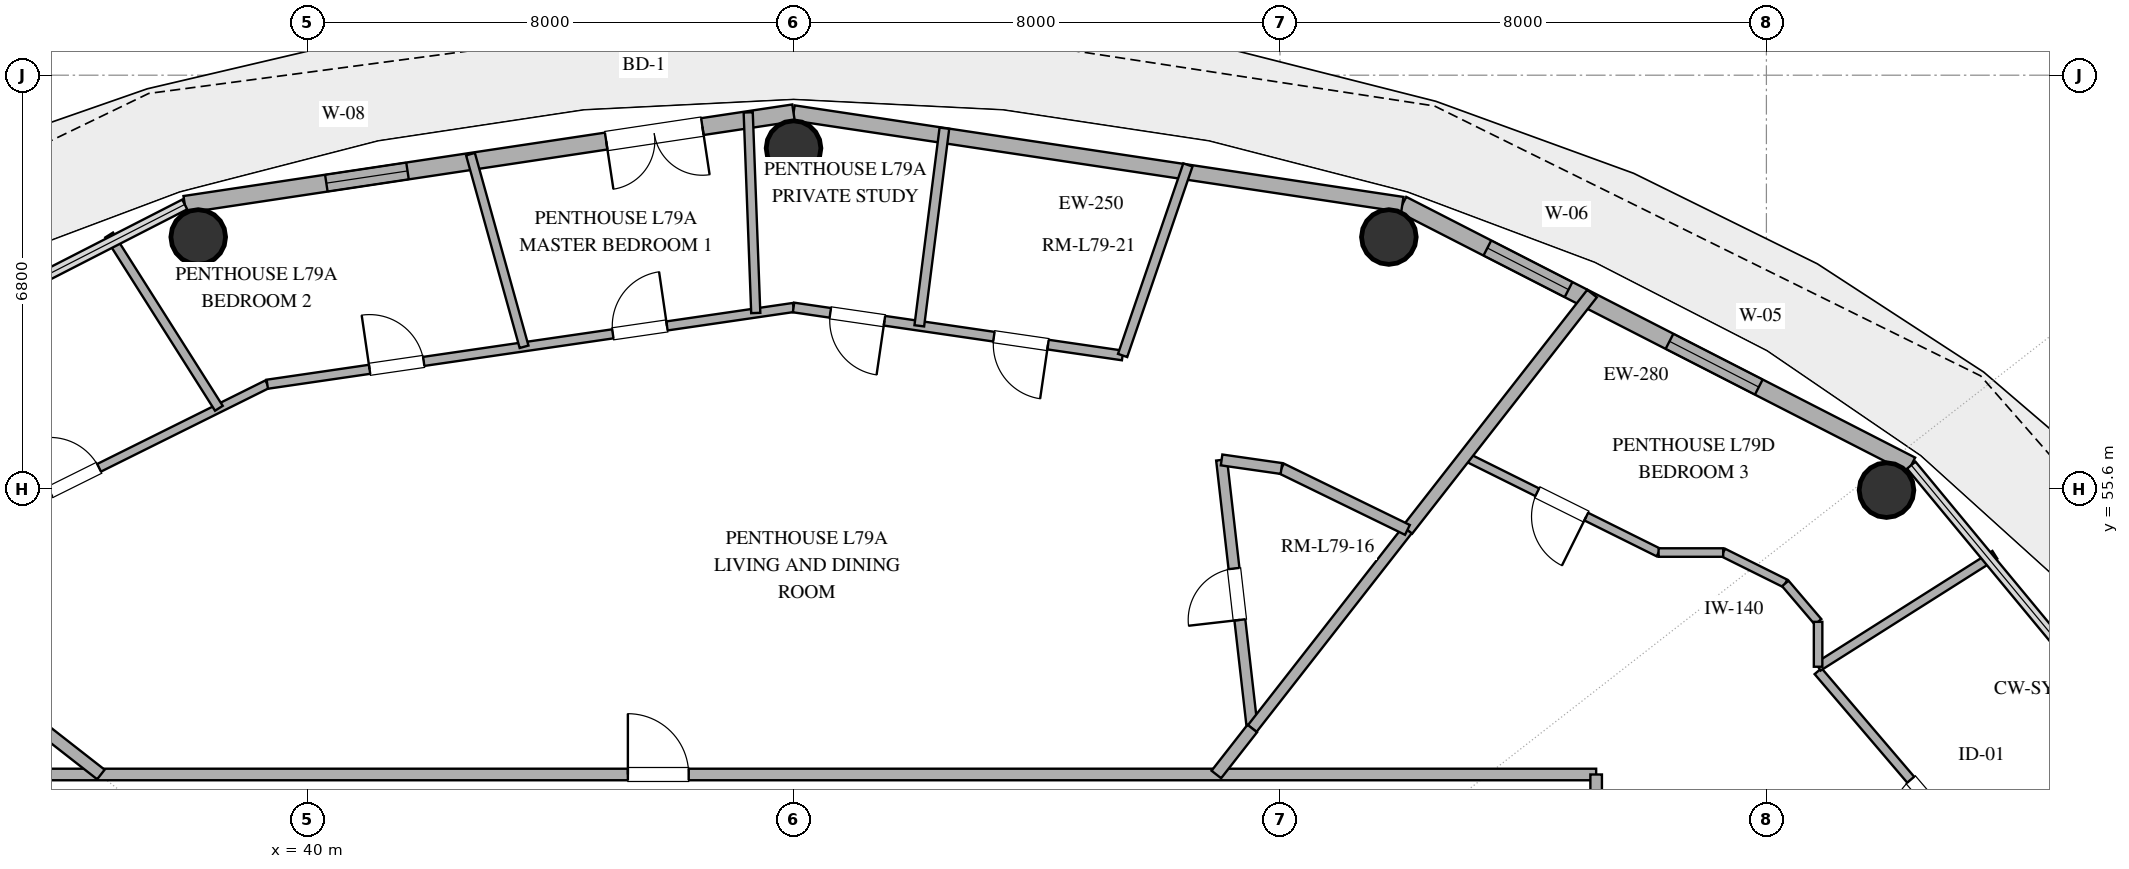
"""IFC4 building model, lengths in metres.
Left out: names, types, materials, properties, quantities, classifications, styles, units other than length and angle.
Written with IfcOpenShell. Run it as: python <this file> out.ifc"""

import sys

from ifc_helpers import new_model, si_unit, direction, frame, frame_2d, origin, origin_2d, place, context, subcontext, project, spatial, rectangle, hollow_circle, extrude, element, fill, save


model = new_model("IFC4")
c1 = context("Model", 3, precision=1e-05, world=origin(), true_north=direction((0.0, 1.0)))
c2 = subcontext(c1, "Body", "Model", "MODEL_VIEW")
j1 = project(units=[si_unit("LENGTHUNIT", "METRE"), si_unit("PLANEANGLEUNIT", "RADIAN")], contexts=[c1])
p1 = place(None, origin())
s1 = spatial("IfcSite", under=j1, at=p1, CompositionType="ELEMENT")
p2 = place(p1, origin())
s2 = spatial("IfcBuilding", under=s1, at=p2, CompositionType="ELEMENT")
p3 = place(p2, frame((0.0, 0.0, 305.4)))
s3 = spatial("IfcBuildingStorey", under=s2, at=p3, CompositionType="ELEMENT", Elevation=305.4)
for number, where, z_axis, x_axis in (
    (1, (65.975, 55.576, 0.0), (0.0, 0.0, 1.0), (1.0, 0.0, 0.0)),
    (2, (57.791, 59.739, 0.0), (0.0, 0.0, 1.0), (1.0, 0.0, 0.0)),
    (3, (48.0, 61.2, 0.0), (0.0, 0.0, 1.0), (1.0, 0.0, 0.0)),
    (4, (38.209, 59.739, 0.0), (0.0, 0.0, 1.0), (1.0, 0.0, 0.0)),
):
    element("IfcColumn", number, at=place(p3, frame(where, z_axis=z_axis, x_axis=x_axis)), inside=s3, PredefinedType="COLUMN", context=c2, shape_type="SweptSolid", body=[
        extrude(hollow_circle(Radius=0.45, WallThickness=0.025, at=origin_2d()), origin(), (0.0, 0.0, 1.0), 3.37),
    ])
p4 = place(p3, frame((66.383, 55.987, 0.0), z_axis=(0.0, 0.0, 1.0), x_axis=(-0.890007394051, 0.455946091699, 0.0)))
e5 = element("IfcWall", 5, at=p4, inside=s3, PredefinedType="SOLIDWALL", context=c2, shape_type="SweptSolid", body=[
    extrude(rectangle(XDim=9.404, YDim=0.28, at=frame_2d((4.702, 0.0))), origin(), (0.0, 0.0, 1.0), 3.37),
])
p5 = place(p4, frame((2.817, 0.0, 0.85)))
e6 = element("IfcOpeningElement", 6, at=p5, cuts=e5, PredefinedType="OPENING", context=c2, shape_type="SweptSolid", body=[
    extrude(rectangle(XDim=1.65, YDim=2.0, at=frame_2d((0.825, 1.0))), frame((0.0, 0.15, 0.0), z_axis=(0.0, -1.0, 0.0), x_axis=(1.0, 0.0, 0.0)), (0.0, 0.0, 1.0), 0.3),
])
p6 = place(p4, frame((6.333, 0.0, 0.85)))
e7 = element("IfcOpeningElement", 7, at=p6, cuts=e5, PredefinedType="OPENING", context=c2, shape_type="SweptSolid", body=[
    extrude(rectangle(XDim=1.5, YDim=2.0, at=frame_2d((0.75, 1.0))), frame((0.0, 0.15, 0.0), z_axis=(0.0, -1.0, 0.0), x_axis=(1.0, 0.0, 0.0)), (0.0, 0.0, 1.0), 0.3),
])
p7 = place(p3, frame((58.013, 60.274, 0.0), z_axis=(0.0, 0.0, 1.0), x_axis=(-0.988882522213, 0.148698881169, 0.0)))
e8 = element("IfcWall", 8, at=p7, inside=s3, PredefinedType="SOLIDWALL", context=c2, shape_type="SweptSolid", body=[
    extrude(rectangle(XDim=10.125, YDim=0.25, at=frame_2d((5.062, 0.0))), origin(), (0.0, 0.0, 1.0), 3.37),
])
p8 = place(p3, frame((48.0, 61.78, 0.0), z_axis=(0.0, 0.0, 1.0), x_axis=(-0.988882522213, -0.148698881169, 0.0)))
e9 = element("IfcWall", 9, at=p8, inside=s3, PredefinedType="SOLIDWALL", context=c2, shape_type="SweptSolid", body=[
    extrude(rectangle(XDim=10.125, YDim=0.28, at=frame_2d((5.062, 0.0))), origin(), (0.0, 0.0, 1.0), 3.37),
])
p9 = place(p8, frame((1.516, 0.0, 0.0)))
e10 = element("IfcOpeningElement", 10, at=p9, cuts=e9, PredefinedType="OPENING", context=c2, shape_type="SweptSolid", body=[
    extrude(rectangle(XDim=1.6, YDim=2.25, at=frame_2d((0.8, 1.125))), frame((0.0, 0.15, 0.0), z_axis=(0.0, -1.0, 0.0), x_axis=(1.0, 0.0, 0.0)), (0.0, 0.0, 1.0), 0.3),
])
p10 = place(p8, frame((6.42, 0.0, 0.85)))
e11 = element("IfcOpeningElement", 11, at=p10, cuts=e9, PredefinedType="OPENING", context=c2, shape_type="SweptSolid", body=[
    extrude(rectangle(XDim=1.35, YDim=1.8, at=frame_2d((0.675, 0.9))), frame((0.0, 0.15, 0.0), z_axis=(0.0, -1.0, 0.0), x_axis=(1.0, 0.0, 0.0)), (0.0, 0.0, 1.0), 0.3),
])
p11 = place(p3, frame((34.8, 50.9, 0.0), z_axis=(0.0, 0.0, 1.0), x_axis=(1.0, 0.0, 0.0)))
e12 = element("IfcWall", 12, at=p11, inside=s3, PredefinedType="PARTITIONING", context=c2, shape_type="SweptSolid", body=[
    extrude(rectangle(XDim=26.4, YDim=0.19, at=frame_2d((13.2, 0.0))), origin(), (0.0, 0.0, 1.0), 2.73),
])
p12 = place(p11, frame((10.475, 0.0, 0.0)))
e13 = element("IfcOpeningElement", 13, at=p12, cuts=e12, PredefinedType="OPENING", context=c2, shape_type="SweptSolid", body=[
    extrude(rectangle(XDim=1.0, YDim=2.2, at=frame_2d((0.5, 1.1))), frame((0.0, 0.105, 0.0), z_axis=(0.0, -1.0, 0.0), x_axis=(1.0, 0.0, 0.0)), (0.0, 0.0, 1.0), 0.21),
])
p13 = place(p3, frame((61.2, 50.9, 0.0), z_axis=(0.0, 0.0, 1.0), x_axis=(0.0, -1.0, 0.0)))
e14 = element("IfcWall", 14, at=p13, inside=s3, PredefinedType="PARTITIONING", context=c2, shape_type="SweptSolid", body=[
    extrude(rectangle(XDim=16.885, YDim=0.19, at=frame_2d((8.442, 0.0))), origin(), (0.0, 0.0, 1.0), 2.73),
])
p14 = place(p13, frame((7.942, 0.0, 0.0)))
e15 = element("IfcOpeningElement", 15, at=p14, cuts=e14, PredefinedType="OPENING", context=c2, shape_type="SweptSolid", body=[
    extrude(rectangle(XDim=1.0, YDim=2.2, at=frame_2d((0.5, 1.1))), frame((0.0, 0.105, 0.0), z_axis=(0.0, -1.0, 0.0), x_axis=(1.0, 0.0, 0.0)), (0.0, 0.0, 1.0), 0.21),
])
p15 = place(p3, frame((68.481, 48.345, 0.0), z_axis=(0.0, 0.0, 1.0), x_axis=(-0.649208179997, 0.760610767097, 0.0)))
e16 = element("IfcWall", 16, at=p15, inside=s3, PredefinedType="PARTITIONING", context=c2, shape_type="SweptSolid", body=[
    extrude(rectangle(XDim=5.593, YDim=0.15, at=frame_2d((2.796, 0.0))), origin(), (0.0, 0.0, 1.0), 2.73),
])
p16 = place(p15, frame((2.346, 0.0, 0.0)))
e17 = element("IfcOpeningElement", 17, at=p16, cuts=e16, PredefinedType="OPENING", context=c2, shape_type="SweptSolid", body=[
    extrude(rectangle(XDim=0.9, YDim=2.1, at=frame_2d((0.45, 1.05))), frame((0.0, 0.085, 0.0), z_axis=(0.0, -1.0, 0.0), x_axis=(1.0, 0.0, 0.0)), (0.0, 0.0, 1.0), 0.17),
])
p17 = place(p3, frame((36.608, 50.9, 0.0), z_axis=(0.0, 0.0, 1.0), x_axis=(-0.78801493083, 0.615656128686, 0.0)))
e18 = element("IfcWall", 18, at=p17, inside=s3, PredefinedType="PARTITIONING", context=c2, shape_type="SweptSolid", body=[
    extrude(rectangle(XDim=8.624, YDim=0.2, at=frame_2d((4.312, 0.0))), origin(), (0.0, 0.0, 1.0), 2.73),
])
p18 = place(p3, frame((33.773, 54.55, 0.0), z_axis=(0.0, 0.0, 1.0), x_axis=(0.895593510097, 0.44487331306, 0.0)))
e19 = element("IfcWall", 19, at=p18, inside=s3, PredefinedType="PARTITIONING", context=c2, shape_type="SweptSolid", body=[
    extrude(rectangle(XDim=6.222, YDim=0.14, at=frame_2d((3.111, 0.0))), origin(), (0.0, 0.0, 1.0), 2.73),
])
p19 = place(p18, frame((2.232, 0.0, 0.0)))
e20 = element("IfcOpeningElement", 20, at=p19, cuts=e19, PredefinedType="OPENING", context=c2, shape_type="SweptSolid", body=[
    extrude(rectangle(XDim=0.9, YDim=2.1, at=frame_2d((0.45, 1.05))), frame((0.0, 0.08, 0.0), z_axis=(0.0, -1.0, 0.0), x_axis=(1.0, 0.0, 0.0)), (0.0, 0.0, 1.0), 0.16),
])
p20 = place(p3, frame((55.544, 51.656, 0.0), z_axis=(0.0, 0.0, 1.0), x_axis=(-0.113517162422, 0.993536035499, 0.0)))
e21 = element("IfcWall", 21, at=p20, inside=s3, PredefinedType="PLUMBINGWALL", context=c2, shape_type="SweptSolid", body=[
    extrude(rectangle(XDim=4.446, YDim=0.18, at=frame_2d((2.223, 0.0))), origin(), (0.0, 0.0, 1.0), 2.73),
])
p21 = place(p20, frame((1.798, 0.0, 0.0)))
e22 = element("IfcOpeningElement", 22, at=p21, cuts=e21, PredefinedType="OPENING", context=c2, shape_type="SweptSolid", body=[
    extrude(rectangle(XDim=0.85, YDim=2.1, at=frame_2d((0.425, 1.05))), frame((0.0, 0.1, 0.0), z_axis=(0.0, -1.0, 0.0), x_axis=(1.0, 0.0, 0.0)), (0.0, 0.0, 1.0), 0.2),
])
p22 = place(p3, frame((39.345, 57.318, 0.0), z_axis=(0.0, 0.0, 1.0), x_axis=(0.989532150642, 0.144312587273, 0.0)))
e23 = element("IfcWall", 23, at=p22, inside=s3, PredefinedType="PARTITIONING", context=c2, shape_type="SweptSolid", body=[
    extrude(rectangle(XDim=8.746, YDim=0.15, at=frame_2d((4.373, 0.0))), origin(), (0.0, 0.0, 1.0), 2.73),
])
p23 = place(p22, frame((1.7, 0.0, 0.0)))
e24 = element("IfcOpeningElement", 24, at=p23, cuts=e23, PredefinedType="OPENING", context=c2, shape_type="SweptSolid", body=[
    extrude(rectangle(XDim=0.9, YDim=2.1, at=frame_2d((0.45, 1.05))), frame((0.0, 0.085, 0.0), z_axis=(0.0, -1.0, 0.0), x_axis=(1.0, 0.0, 0.0)), (0.0, 0.0, 1.0), 0.17),
])
p24 = place(p22, frame((5.743, 0.0, 0.0)))
e25 = element("IfcOpeningElement", 25, at=p24, cuts=e23, PredefinedType="OPENING", context=c2, shape_type="SweptSolid", body=[
    extrude(rectangle(XDim=0.9, YDim=2.1, at=frame_2d((0.45, 1.05))), frame((0.0, 0.085, 0.0), z_axis=(0.0, -1.0, 0.0), x_axis=(1.0, 0.0, 0.0)), (0.0, 0.0, 1.0), 0.17),
])
p25 = place(p3, frame((58.096, 54.922, 0.0), z_axis=(0.0, 0.0, 1.0), x_axis=(-0.615652044057, -0.788018122031, 0.0)))
e26 = element("IfcWall", 26, at=p25, inside=s3, PredefinedType="PLUMBINGWALL", context=c2, shape_type="SweptSolid", body=[
    extrude(rectangle(XDim=4.144, YDim=0.18, at=frame_2d((2.072, 0.0))), origin(), (0.0, 0.0, 1.0), 2.73),
])
p26 = place(p3, frame((62.227, 54.55, 0.0), z_axis=(0.0, 0.0, 1.0), x_axis=(-0.895591084679, 0.444878195739, 0.0)))
e27 = element("IfcWall", 27, at=p26, inside=s3, PredefinedType="PARTITIONING", context=c2, shape_type="SweptSolid", body=[
    extrude(rectangle(XDim=3.557, YDim=0.14, at=frame_2d((1.778, 0.0))), origin(), (0.0, 0.0, 1.0), 2.73),
])
p27 = place(p26, frame((1.328, 0.0, 0.0)))
e28 = element("IfcOpeningElement", 28, at=p27, cuts=e27, PredefinedType="OPENING", context=c2, shape_type="SweptSolid", body=[
    extrude(rectangle(XDim=0.9, YDim=2.1, at=frame_2d((0.45, 1.05))), frame((0.0, 0.08, 0.0), z_axis=(0.0, -1.0, 0.0), x_axis=(1.0, 0.0, 0.0)), (0.0, 0.0, 1.0), 0.16),
])
p28 = place(p3, frame((64.85, 52.672, 0.0), z_axis=(0.0, 0.0, 1.0), x_axis=(0.84478165195, 0.535111166515, 0.0)))
e29 = element("IfcWall", 29, at=p28, inside=s3, PredefinedType="PARTITIONING", context=c2, shape_type="SweptSolid", body=[
    extrude(rectangle(XDim=3.44, YDim=0.15, at=frame_2d((1.72, 0.0))), origin(), (0.0, 0.0, 1.0), 2.73),
])
p29 = place(p3, frame((58.096, 54.922, 0.0), z_axis=(0.0, 0.0, 1.0), x_axis=(0.615676703635, 0.78799885571, 0.0)))
e30 = element("IfcWall", 30, at=p29, inside=s3, PredefinedType="PARTITIONING", context=c2, shape_type="SweptSolid", body=[
    extrude(rectangle(XDim=4.932, YDim=0.2, at=frame_2d((2.466, 0.0))), origin(), (0.0, 0.0, 1.0), 2.73),
])
p30 = place(p3, frame((53.412, 57.791, 0.0), z_axis=(0.0, 0.0, 1.0), x_axis=(-0.989530988967, 0.144320552503, 0.0)))
e31 = element("IfcWall", 31, at=p30, inside=s3, PredefinedType="PLUMBINGWALL", context=c2, shape_type="SweptSolid", body=[
    extrude(rectangle(XDim=5.469, YDim=0.16, at=frame_2d((2.735, 0.0))), origin(), (0.0, 0.0, 1.0), 2.73),
])
p31 = place(p30, frame((1.24, 0.0, 0.0)))
e32 = element("IfcOpeningElement", 32, at=p31, cuts=e31, PredefinedType="OPENING", context=c2, shape_type="SweptSolid", body=[
    extrude(rectangle(XDim=0.9, YDim=2.1, at=frame_2d((0.45, 1.05))), frame((0.0, 0.09, 0.0), z_axis=(0.0, -1.0, 0.0), x_axis=(1.0, 0.0, 0.0)), (0.0, 0.0, 1.0), 0.18),
])
p32 = place(p30, frame((3.958, 0.0, 0.0)))
e33 = element("IfcOpeningElement", 33, at=p32, cuts=e31, PredefinedType="OPENING", context=c2, shape_type="SweptSolid", body=[
    extrude(rectangle(XDim=0.9, YDim=2.1, at=frame_2d((0.45, 1.05))), frame((0.0, 0.09, 0.0), z_axis=(0.0, -1.0, 0.0), x_axis=(1.0, 0.0, 0.0)), (0.0, 0.0, 1.0), 0.18),
])
p33 = place(p3, frame((38.549, 56.922, 0.0), z_axis=(0.0, 0.0, 1.0), x_axis=(-0.535019359821, 0.844839798197, 0.0)))
e34 = element("IfcWall", 34, at=p33, inside=s3, PredefinedType="PARTITIONING", context=c2, shape_type="SweptSolid", body=[
    extrude(rectangle(XDim=3.373, YDim=0.15, at=frame_2d((1.686, 0.0))), origin(), (0.0, 0.0, 1.0), 2.73),
])
p34 = place(p3, frame((54.486, 60.924, 0.0), z_axis=(0.0, 0.0, 1.0), x_axis=(-0.324177330806, -0.945996330961, 0.0)))
e35 = element("IfcWall", 35, at=p34, inside=s3, PredefinedType="PLUMBINGWALL", context=c2, shape_type="SweptSolid", body=[
    extrude(rectangle(XDim=3.312, YDim=0.16, at=frame_2d((1.656, 0.0))), origin(), (0.0, 0.0, 1.0), 2.73),
])
p35 = place(p3, frame((47.379, 58.49, 0.0), z_axis=(0.0, 0.0, 1.0), x_axis=(-0.037643519601, 0.99929123154, 0.0)))
e36 = element("IfcWall", 36, at=p35, inside=s3, PredefinedType="PARTITIONING", context=c2, shape_type="SweptSolid", body=[
    extrude(rectangle(XDim=3.301, YDim=0.15, at=frame_2d((1.651, 0.0))), origin(), (0.0, 0.0, 1.0), 2.73),
])
p36 = place(p3, frame((43.568, 57.934, 0.0), z_axis=(0.0, 0.0, 1.0), x_axis=(-0.267957857452, 0.963430634052, 0.0)))
e37 = element("IfcWall", 37, at=p36, inside=s3, PredefinedType="PARTITIONING", context=c2, shape_type="SweptSolid", body=[
    extrude(rectangle(XDim=3.288, YDim=0.15, at=frame_2d((1.644, 0.0))), origin(), (0.0, 0.0, 1.0), 2.73),
])
p37 = place(p3, frame((50.481, 61.528, 0.0), z_axis=(0.0, 0.0, 1.0), x_axis=(-0.1260156089, -0.992028258828, 0.0)))
e38 = element("IfcWall", 38, at=p37, inside=s3, PredefinedType="PLUMBINGWALL", context=c2, shape_type="SweptSolid", body=[
    extrude(rectangle(XDim=3.276, YDim=0.16, at=frame_2d((1.638, 0.0))), origin(), (0.0, 0.0, 1.0), 2.73),
])
p38 = place(p3, frame((56.024, 55.932, 0.0), z_axis=(0.0, 0.0, 1.0), x_axis=(0.898893612682, -0.438166946585, 0.0)))
e39 = element("IfcWall", 39, at=p38, inside=s3, PredefinedType="PLUMBINGWALL", context=c2, shape_type="SweptSolid", body=[
    extrude(rectangle(XDim=2.305, YDim=0.18, at=frame_2d((1.153, 0.0))), origin(), (0.0, 0.0, 1.0), 2.73),
])
p39 = place(p3, frame((64.311, 54.042, 0.0), z_axis=(0.0, 0.0, 1.0), x_axis=(-0.895409226325, 0.445244109912, 0.0)))
e40 = element("IfcWall", 40, at=p39, inside=s3, PredefinedType="PARTITIONING", context=c2, shape_type="SweptSolid", body=[
    extrude(rectangle(XDim=1.141, YDim=0.14, at=frame_2d((0.571, 0.0))), origin(), (0.0, 0.0, 1.0), 2.73),
])
p40 = place(p3, frame((63.289, 54.55, 0.0), z_axis=(0.0, 0.0, 1.0), x_axis=(-1.0, 0.0, 0.0)))
e41 = element("IfcWall", 41, at=p40, inside=s3, PredefinedType="PARTITIONING", context=c2, shape_type="SweptSolid", body=[
    extrude(rectangle(XDim=1.062, YDim=0.14, at=frame_2d((0.531, 0.0))), origin(), (0.0, 0.0, 1.0), 2.73),
])
p41 = place(p3, frame((55.04, 56.073, 0.0), z_axis=(0.0, 0.0, 1.0), x_axis=(0.989910163558, -0.141696394039, 0.0)))
e42 = element("IfcWall", 42, at=p41, inside=s3, PredefinedType="PLUMBINGWALL", context=c2, shape_type="SweptSolid", body=[
    extrude(rectangle(XDim=0.994, YDim=0.18, at=frame_2d((0.497, 0.0))), origin(), (0.0, 0.0, 1.0), 2.73),
])
p42 = place(p3, frame((55.544, 51.656, 0.0), z_axis=(0.0, 0.0, 1.0), x_axis=(-0.615752619539, -0.787939535453, 0.0)))
e43 = element("IfcWall", 43, at=p42, inside=s3, PredefinedType="PARTITIONING", context=c2, shape_type="SweptSolid", body=[
    extrude(rectangle(XDim=0.96, YDim=0.2, at=frame_2d((0.48, 0.0))), origin(), (0.0, 0.0, 1.0), 2.73),
])
p43 = place(p3, frame((64.85, 53.41, 0.0), z_axis=(0.0, 0.0, 1.0), x_axis=(-0.649191857323, 0.760624698774, 0.0)))
e44 = element("IfcWall", 44, at=p43, inside=s3, PredefinedType="PARTITIONING", context=c2, shape_type="SweptSolid", body=[
    extrude(rectangle(XDim=0.83, YDim=0.14, at=frame_2d((0.415, 0.0))), origin(), (0.0, 0.0, 1.0), 2.73),
])
p44 = place(p3, frame((64.85, 52.672, 0.0), z_axis=(0.0, 0.0, 1.0), x_axis=(0.0, 1.0, 0.0)))
e45 = element("IfcWall", 45, at=p44, inside=s3, PredefinedType="PARTITIONING", context=c2, shape_type="SweptSolid", body=[
    extrude(rectangle(XDim=0.739, YDim=0.14, at=frame_2d((0.369, 0.0))), origin(), (0.0, 0.0, 1.0), 2.73),
])
p45 = place(p5, origin())
e46 = element("IfcWindow", 46, at=p45, inside=s3, PartitioningType="SINGLE_PANEL", PredefinedType="WINDOW", context=c2, shape_type="SweptSolid", body=[
    extrude(rectangle(XDim=1.65, YDim=2.0, at=frame_2d((0.825, 1.0))), frame((0.0, 0.03, 0.0), z_axis=(0.0, -1.0, 0.0), x_axis=(1.0, 0.0, 0.0)), (0.0, 0.0, 1.0), 0.06),
])
fill(e6, e46)
p46 = place(p6, origin())
e47 = element("IfcWindow", 47, at=p46, inside=s3, PartitioningType="SINGLE_PANEL", PredefinedType="WINDOW", context=c2, shape_type="SweptSolid", body=[
    extrude(rectangle(XDim=1.5, YDim=2.0, at=frame_2d((0.75, 1.0))), frame((0.0, 0.03, 0.0), z_axis=(0.0, -1.0, 0.0), x_axis=(1.0, 0.0, 0.0)), (0.0, 0.0, 1.0), 0.06),
])
fill(e7, e47)
p47 = place(p9, origin())
e48 = element("IfcDoor", 48, at=p47, inside=s3, OperationType="DOUBLE_DOOR_SINGLE_SWING", PredefinedType="DOOR", context=c2, shape_type="SweptSolid", body=[
    extrude(rectangle(XDim=1.6, YDim=2.25, at=frame_2d((0.8, 1.125))), frame((0.0, 0.025, 0.0), z_axis=(0.0, -1.0, 0.0), x_axis=(1.0, 0.0, 0.0)), (0.0, 0.0, 1.0), 0.05),
])
fill(e10, e48)
p48 = place(p10, origin())
e49 = element("IfcWindow", 49, at=p48, inside=s3, PartitioningType="SINGLE_PANEL", PredefinedType="WINDOW", context=c2, shape_type="SweptSolid", body=[
    extrude(rectangle(XDim=1.35, YDim=1.8, at=frame_2d((0.675, 0.9))), frame((0.0, 0.03, 0.0), z_axis=(0.0, -1.0, 0.0), x_axis=(1.0, 0.0, 0.0)), (0.0, 0.0, 1.0), 0.06),
])
fill(e11, e49)
p49 = place(p12, origin())
e50 = element("IfcDoor", 50, at=p49, inside=s3, OperationType="SINGLE_SWING_LEFT", PredefinedType="DOOR", context=c2, shape_type="SweptSolid", body=[
    extrude(rectangle(XDim=1.0, YDim=2.2, at=frame_2d((0.5, 1.1))), frame((0.0, 0.025, 0.0), z_axis=(0.0, -1.0, 0.0), x_axis=(1.0, 0.0, 0.0)), (0.0, 0.0, 1.0), 0.05),
])
fill(e13, e50)
p50 = place(p16, origin())
e51 = element("IfcDoor", 51, at=p50, inside=s3, OperationType="SINGLE_SWING_LEFT", PredefinedType="DOOR", context=c2, shape_type="SweptSolid", body=[
    extrude(rectangle(XDim=0.9, YDim=2.1, at=frame_2d((0.45, 1.05))), frame((0.0, 0.025, 0.0), z_axis=(0.0, -1.0, 0.0), x_axis=(1.0, 0.0, 0.0)), (0.0, 0.0, 1.0), 0.05),
])
fill(e17, e51)
p51 = place(p19, origin())
e52 = element("IfcDoor", 52, at=p51, inside=s3, OperationType="SINGLE_SWING_LEFT", PredefinedType="DOOR", context=c2, shape_type="SweptSolid", body=[
    extrude(rectangle(XDim=0.9, YDim=2.1, at=frame_2d((0.45, 1.05))), frame((0.0, 0.025, 0.0), z_axis=(0.0, -1.0, 0.0), x_axis=(1.0, 0.0, 0.0)), (0.0, 0.0, 1.0), 0.05),
])
fill(e20, e52)
p52 = place(p21, origin())
e53 = element("IfcDoor", 53, at=p52, inside=s3, OperationType="SINGLE_SWING_LEFT", PredefinedType="DOOR", context=c2, shape_type="SweptSolid", body=[
    extrude(rectangle(XDim=0.85, YDim=2.1, at=frame_2d((0.425, 1.05))), frame((0.0, 0.025, 0.0), z_axis=(0.0, -1.0, 0.0), x_axis=(1.0, 0.0, 0.0)), (0.0, 0.0, 1.0), 0.05),
])
fill(e22, e53)
p53 = place(p23, origin())
e54 = element("IfcDoor", 54, at=p53, inside=s3, OperationType="SINGLE_SWING_LEFT", PredefinedType="DOOR", context=c2, shape_type="SweptSolid", body=[
    extrude(rectangle(XDim=0.9, YDim=2.1, at=frame_2d((0.45, 1.05))), frame((0.0, 0.025, 0.0), z_axis=(0.0, -1.0, 0.0), x_axis=(1.0, 0.0, 0.0)), (0.0, 0.0, 1.0), 0.05),
])
fill(e24, e54)
p54 = place(p24, origin())
e55 = element("IfcDoor", 55, at=p54, inside=s3, OperationType="SINGLE_SWING_RIGHT", PredefinedType="DOOR", context=c2, shape_type="SweptSolid", body=[
    extrude(rectangle(XDim=0.9, YDim=2.1, at=frame_2d((0.45, 1.05))), frame((0.0, 0.025, 0.0), z_axis=(0.0, -1.0, 0.0), x_axis=(1.0, 0.0, 0.0)), (0.0, 0.0, 1.0), 0.05),
])
fill(e25, e55)
p55 = place(p27, origin())
e56 = element("IfcDoor", 56, at=p55, inside=s3, OperationType="SINGLE_SWING_LEFT", PredefinedType="DOOR", context=c2, shape_type="SweptSolid", body=[
    extrude(rectangle(XDim=0.9, YDim=2.1, at=frame_2d((0.45, 1.05))), frame((0.0, 0.025, 0.0), z_axis=(0.0, -1.0, 0.0), x_axis=(1.0, 0.0, 0.0)), (0.0, 0.0, 1.0), 0.05),
])
fill(e28, e56)
p56 = place(p31, origin())
e57 = element("IfcDoor", 57, at=p56, inside=s3, OperationType="SINGLE_SWING_LEFT", PredefinedType="DOOR", context=c2, shape_type="SweptSolid", body=[
    extrude(rectangle(XDim=0.9, YDim=2.1, at=frame_2d((0.45, 1.05))), frame((0.0, 0.025, 0.0), z_axis=(0.0, -1.0, 0.0), x_axis=(1.0, 0.0, 0.0)), (0.0, 0.0, 1.0), 0.05),
])
fill(e32, e57)
p57 = place(p32, origin())
e58 = element("IfcDoor", 58, at=p57, inside=s3, OperationType="SINGLE_SWING_LEFT", PredefinedType="DOOR", context=c2, shape_type="SweptSolid", body=[
    extrude(rectangle(XDim=0.9, YDim=2.1, at=frame_2d((0.45, 1.05))), frame((0.0, 0.025, 0.0), z_axis=(0.0, -1.0, 0.0), x_axis=(1.0, 0.0, 0.0)), (0.0, 0.0, 1.0), 0.05),
])
fill(e33, e58)
save(model, sys.argv[1])
